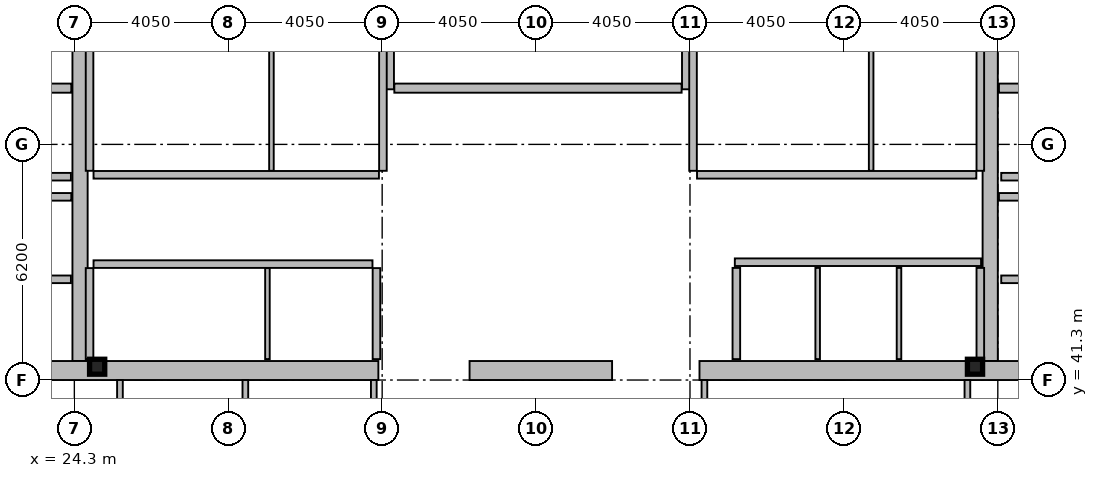
"""IFC4 building model, lengths in metres.
Left out: names, types, materials, properties, quantities, classifications, styles, units other than length and angle.
Written with IfcOpenShell. Run it as: python <this file> out.ifc"""

import sys

from ifc_helpers import new_model, si_unit, direction, frame, frame_2d, origin, origin_2d, place, context, subcontext, project, spatial, rectangle, i_section, extrude, element, fill, save


model = new_model("IFC4")
c1 = context("Model", 3, precision=1e-05, world=origin(), true_north=direction((0.0, 1.0)))
c2 = subcontext(c1, "Body", "Model", "MODEL_VIEW")
j1 = project(units=[si_unit("LENGTHUNIT", "METRE"), si_unit("PLANEANGLEUNIT", "RADIAN")], contexts=[c1])
p1 = place(None, origin())
s1 = spatial("IfcSite", under=j1, at=p1, CompositionType="ELEMENT")
p2 = place(p1, origin())
s2 = spatial("IfcBuilding", under=s1, at=p2, CompositionType="ELEMENT")
p3 = place(p2, frame((0.0, 0.0, 329.0)))
s3 = spatial("IfcBuildingStorey", under=s2, at=p3, CompositionType="ELEMENT", Elevation=329.0)
for number, where, z_axis, x_axis in (
    (1, (24.45, 41.8, 0.0), (0.0, 0.0, 1.0), (0.0, 1.0, 0.0)),
    (2, (48.4, 41.8, 0.0), (0.0, 0.0, 1.0), (0.0, 1.0, 0.0)),
):
    element("IfcWall", number, at=place(p3, frame(where, z_axis=z_axis, x_axis=x_axis)), inside=s3, PredefinedType="SHEAR", context=c2, shape_type="SweptSolid", body=[
        extrude(rectangle(XDim=11.4, YDim=0.4, at=frame_2d((5.7, 0.0))), origin(), (0.0, 0.0, 1.0), 3.44),
    ])
p4 = place(p3, frame((32.3, 41.55, 0.0), z_axis=(0.0, 0.0, 1.0), x_axis=(-1.0, 0.0, 0.0)))
e3 = element("IfcWall", 3, at=p4, inside=s3, PredefinedType="SHEAR", context=c2, shape_type="SweptSolid", body=[
    extrude(rectangle(XDim=11.45, YDim=0.5, at=frame_2d((5.725, 0.0))), origin(), (0.0, 0.0, 1.0), 3.44),
])
p5 = place(p3, frame((38.45, 41.55, 0.0), z_axis=(0.0, 0.0, 1.0), x_axis=(-1.0, 0.0, 0.0)))
e4 = element("IfcWall", 4, at=p5, inside=s3, PredefinedType="SHEAR", context=c2, shape_type="SweptSolid", body=[
    extrude(rectangle(XDim=3.75, YDim=0.5, at=frame_2d((1.875, 0.0))), origin(), (0.0, 0.0, 1.0), 3.44),
])
p6 = place(p3, frame((52.05, 41.55, 0.0), z_axis=(0.0, 0.0, 1.0), x_axis=(-1.0, 0.0, 0.0)))
e5 = element("IfcWall", 5, at=p6, inside=s3, PredefinedType="SHEAR", context=c2, shape_type="SweptSolid", body=[
    extrude(rectangle(XDim=11.3, YDim=0.5, at=frame_2d((5.65, 0.0))), origin(), (0.0, 0.0, 1.0), 3.44),
])
for number, where, z_axis, x_axis in (
    (6, (32.58, 48.95, 0.0), (0.0, 0.0, 1.0), (0.0, 1.0, 0.0)),
    (7, (40.42, 48.95, 0.0), (0.0, 0.0, 1.0), (0.0, 1.0, 0.0)),
):
    element("IfcWall", number, at=place(p3, frame(where, z_axis=z_axis, x_axis=x_axis)), inside=s3, PredefinedType="SHEAR", context=c2, shape_type="SweptSolid", body=[
        extrude(rectangle(XDim=4.25, YDim=0.26, at=frame_2d((2.125, 0.0))), origin(), (0.0, 0.0, 1.0), 3.44),
    ])
p7 = place(p3, frame((16.7, 48.98, 0.0), z_axis=(0.0, 0.0, 1.0), x_axis=(1.0, 0.0, 0.0)))
e8 = element("IfcWall", 8, at=p7, inside=s3, PredefinedType="SHEAR", context=c2, shape_type="SweptSolid", body=[
    extrude(rectangle(XDim=7.52, YDim=0.24, at=frame_2d((3.76, 0.0))), origin(), (0.0, 0.0, 1.0), 3.44),
])
p8 = place(p7, frame((0.22, 0.0, 0.0)))
e9 = element("IfcOpeningElement", 9, at=p8, cuts=e8, PredefinedType="OPENING", context=c2, shape_type="SweptSolid", body=[
    extrude(rectangle(XDim=1.05, YDim=2.15, at=frame_2d((0.525, 1.075))), frame((0.0, 0.13, 0.0), z_axis=(0.0, -1.0, 0.0), x_axis=(1.0, 0.0, 0.0)), (0.0, 0.0, 1.0), 0.26),
])
p9 = place(p3, frame((48.63, 48.98, 0.0), z_axis=(0.0, 0.0, 1.0), x_axis=(1.0, 0.0, 0.0)))
e10 = element("IfcWall", 10, at=p9, inside=s3, PredefinedType="SHEAR", context=c2, shape_type="SweptSolid", body=[
    extrude(rectangle(XDim=7.57, YDim=0.24, at=frame_2d((3.785, 0.0))), origin(), (0.0, 0.0, 1.0), 3.44),
])
p10 = place(p9, frame((6.3, 0.0, 0.0)))
e11 = element("IfcOpeningElement", 11, at=p10, cuts=e10, PredefinedType="OPENING", context=c2, shape_type="SweptSolid", body=[
    extrude(rectangle(XDim=1.05, YDim=2.15, at=frame_2d((0.525, 1.075))), frame((0.0, 0.13, 0.0), z_axis=(0.0, -1.0, 0.0), x_axis=(1.0, 0.0, 0.0)), (0.0, 0.0, 1.0), 0.26),
])
p11 = place(p3, frame((32.72, 48.98, 0.0), z_axis=(0.0, 0.0, 1.0), x_axis=(1.0, 0.0, 0.0)))
e12 = element("IfcWall", 12, at=p11, inside=s3, PredefinedType="SHEAR", context=c2, shape_type="SweptSolid", body=[
    extrude(rectangle(XDim=7.56, YDim=0.24, at=frame_2d((3.78, 0.0))), origin(), (0.0, 0.0, 1.0), 3.44),
])
p12 = place(p11, frame((0.22, 0.0, 0.0)))
e13 = element("IfcOpeningElement", 13, at=p12, cuts=e12, PredefinedType="OPENING", context=c2, shape_type="SweptSolid", body=[
    extrude(rectangle(XDim=1.05, YDim=2.15, at=frame_2d((0.525, 1.075))), frame((0.0, 0.13, 0.0), z_axis=(0.0, -1.0, 0.0), x_axis=(1.0, 0.0, 0.0)), (0.0, 0.0, 1.0), 0.26),
])
for number, where, z_axis, x_axis in (
    (14, (24.9, 41.65, 0.0), (0.0, 0.0, 1.0), (1.0, 0.0, 0.0)),
    (15, (48.0, 41.65, 0.0), (0.0, 0.0, 1.0), (1.0, 0.0, 0.0)),
):
    element("IfcColumn", number, at=place(p3, frame(where, z_axis=z_axis, x_axis=x_axis)), inside=s3, PredefinedType="COLUMN", context=c2, shape_type="SweptSolid", body=[
        extrude(i_section(OverallWidth=0.399, OverallDepth=0.393, WebThickness=0.023, FlangeThickness=0.037, at=origin_2d()), origin(), (0.0, 0.0, 1.0), 3.6),
    ])
p13 = place(p3, frame((41.68, 44.4, 0.0), z_axis=(0.0, 0.0, 1.0), x_axis=(1.0, 0.0, 0.0)))
e16 = element("IfcWall", 16, at=p13, inside=s3, PredefinedType="PARTITIONING", context=c2, shape_type="SweptSolid", body=[
    extrude(rectangle(XDim=6.48, YDim=0.2, at=frame_2d((3.24, 0.0))), origin(), (0.0, 0.0, 1.0), 3.44),
])
p14 = place(p13, frame((0.58, 0.0, 0.0)))
e17 = element("IfcOpeningElement", 17, at=p14, cuts=e16, PredefinedType="OPENING", context=c2, shape_type="SweptSolid", body=[
    extrude(rectangle(XDim=1.1, YDim=2.18, at=frame_2d((0.55, 1.09))), frame((0.0, 0.11, 0.0), z_axis=(0.0, -1.0, 0.0), x_axis=(1.0, 0.0, 0.0)), (0.0, 0.0, 1.0), 0.22),
])
p15 = place(p13, frame((2.74, 0.0, 0.0)))
e18 = element("IfcOpeningElement", 18, at=p15, cuts=e16, PredefinedType="OPENING", context=c2, shape_type="SweptSolid", body=[
    extrude(rectangle(XDim=1.1, YDim=2.18, at=frame_2d((0.55, 1.09))), frame((0.0, 0.11, 0.0), z_axis=(0.0, -1.0, 0.0), x_axis=(1.0, 0.0, 0.0)), (0.0, 0.0, 1.0), 0.22),
])
p16 = place(p13, frame((4.9, 0.0, 0.0)))
e19 = element("IfcOpeningElement", 19, at=p16, cuts=e16, PredefinedType="OPENING", context=c2, shape_type="SweptSolid", body=[
    extrude(rectangle(XDim=1.1, YDim=2.18, at=frame_2d((0.55, 1.09))), frame((0.0, 0.11, 0.0), z_axis=(0.0, -1.0, 0.0), x_axis=(1.0, 0.0, 0.0)), (0.0, 0.0, 1.0), 0.22),
])
p17 = place(p3, frame((51.61, 43.95, 0.0), z_axis=(0.0, 0.0, 1.0), x_axis=(-1.0, 0.0, 0.0)))
e20 = element("IfcWall", 20, at=p17, inside=s3, PredefinedType="PARTITIONING", context=c2, shape_type="SweptSolid", body=[
    extrude(rectangle(XDim=2.92, YDim=0.2, at=frame_2d((1.46, 0.0))), origin(), (0.0, 0.0, 1.0), 3.44),
])
p18 = place(p17, frame((0.81, 0.0, 0.0)))
e21 = element("IfcOpeningElement", 21, at=p18, cuts=e20, PredefinedType="OPENING", context=c2, shape_type="SweptSolid", body=[
    extrude(rectangle(XDim=1.3, YDim=2.18, at=frame_2d((0.65, 1.09))), frame((0.0, 0.11, 0.0), z_axis=(0.0, -1.0, 0.0), x_axis=(1.0, 0.0, 0.0)), (0.0, 0.0, 1.0), 0.22),
])
p19 = place(p3, frame((24.21, 43.95, 0.0), z_axis=(0.0, 0.0, 1.0), x_axis=(-1.0, 0.0, 0.0)))
e22 = element("IfcWall", 22, at=p19, inside=s3, PredefinedType="PARTITIONING", context=c2, shape_type="SweptSolid", body=[
    extrude(rectangle(XDim=2.97, YDim=0.2, at=frame_2d((1.485, 0.0))), origin(), (0.0, 0.0, 1.0), 3.44),
])
p20 = place(p19, frame((0.86, 0.0, 0.0)))
e23 = element("IfcOpeningElement", 23, at=p20, cuts=e22, PredefinedType="OPENING", context=c2, shape_type="SweptSolid", body=[
    extrude(rectangle(XDim=1.3, YDim=2.18, at=frame_2d((0.65, 1.09))), frame((0.0, 0.11, 0.0), z_axis=(0.0, -1.0, 0.0), x_axis=(1.0, 0.0, 0.0)), (0.0, 0.0, 1.0), 0.22),
])
p21 = place(p3, frame((51.61, 46.65, 0.0), z_axis=(0.0, 0.0, 1.0), x_axis=(-1.0, 0.0, 0.0)))
e24 = element("IfcWall", 24, at=p21, inside=s3, PredefinedType="PARTITIONING", context=c2, shape_type="SweptSolid", body=[
    extrude(rectangle(XDim=2.92, YDim=0.2, at=frame_2d((1.46, 0.0))), origin(), (0.0, 0.0, 1.0), 3.44),
])
p22 = place(p21, frame((0.86, 0.0, 0.0)))
e25 = element("IfcOpeningElement", 25, at=p22, cuts=e24, PredefinedType="OPENING", context=c2, shape_type="SweptSolid", body=[
    extrude(rectangle(XDim=1.2, YDim=2.18, at=frame_2d((0.6, 1.09))), frame((0.0, 0.11, 0.0), z_axis=(0.0, -1.0, 0.0), x_axis=(1.0, 0.0, 0.0)), (0.0, 0.0, 1.0), 0.22),
])
p23 = place(p3, frame((24.21, 46.65, 0.0), z_axis=(0.0, 0.0, 1.0), x_axis=(-1.0, 0.0, 0.0)))
e26 = element("IfcWall", 26, at=p23, inside=s3, PredefinedType="PARTITIONING", context=c2, shape_type="SweptSolid", body=[
    extrude(rectangle(XDim=2.97, YDim=0.2, at=frame_2d((1.485, 0.0))), origin(), (0.0, 0.0, 1.0), 3.44),
])
p24 = place(p23, frame((0.91, 0.0, 0.0)))
e27 = element("IfcOpeningElement", 27, at=p24, cuts=e26, PredefinedType="OPENING", context=c2, shape_type="SweptSolid", body=[
    extrude(rectangle(XDim=1.2, YDim=2.18, at=frame_2d((0.6, 1.09))), frame((0.0, 0.11, 0.0), z_axis=(0.0, -1.0, 0.0), x_axis=(1.0, 0.0, 0.0)), (0.0, 0.0, 1.0), 0.22),
])
p25 = place(p3, frame((21.2, 46.12, 0.0), z_axis=(0.0, 0.0, 1.0), x_axis=(1.0, 0.0, 0.0)))
e28 = element("IfcWall", 28, at=p25, inside=s3, PredefinedType="PARTITIONING", context=c2, shape_type="SweptSolid", body=[
    extrude(rectangle(XDim=3.02, YDim=0.2, at=frame_2d((1.51, 0.0))), origin(), (0.0, 0.0, 1.0), 3.44),
])
p26 = place(p3, frame((48.63, 46.12, 0.0), z_axis=(0.0, 0.0, 1.0), x_axis=(1.0, 0.0, 0.0)))
e29 = element("IfcWall", 29, at=p26, inside=s3, PredefinedType="PARTITIONING", context=c2, shape_type="SweptSolid", body=[
    extrude(rectangle(XDim=3.07, YDim=0.2, at=frame_2d((1.535, 0.0))), origin(), (0.0, 0.0, 1.0), 3.44),
])
for number, where, z_axis, x_axis in (
    (30, (24.7, 46.805, 0.0), (0.0, 0.0, 1.0), (0.0, 1.0, 0.0)),
    (31, (32.42, 46.805, 0.0), (0.0, 0.0, 1.0), (0.0, 1.0, 0.0)),
):
    element("IfcWall", number, at=place(p3, frame(where, z_axis=z_axis, x_axis=x_axis)), inside=s3, PredefinedType="PARTITIONING", context=c2, shape_type="SweptSolid", body=[
        extrude(rectangle(XDim=5.99, YDim=0.2, at=frame_2d((2.995, 0.0))), origin(), (0.0, 0.0, 1.0), 3.44),
    ])
p27 = place(p3, frame((29.486, 46.805, 0.0), z_axis=(0.0, 0.0, 1.0), x_axis=(0.0, 1.0, 0.0)))
e32 = element("IfcWall", 32, at=p27, inside=s3, PredefinedType="PARTITIONING", context=c2, shape_type="SweptSolid", body=[
    extrude(rectangle(XDim=5.99, YDim=0.12, at=frame_2d((2.995, 0.0))), origin(), (0.0, 0.0, 1.0), 3.44),
])
p28 = place(p3, frame((24.805, 46.7, 0.0), z_axis=(0.0, 0.0, 1.0), x_axis=(1.0, 0.0, 0.0)))
e33 = element("IfcWall", 33, at=p28, inside=s3, PredefinedType="PARTITIONING", context=c2, shape_type="SweptSolid", body=[
    extrude(rectangle(XDim=7.51, YDim=0.2, at=frame_2d((3.755, 0.0))), origin(), (0.0, 0.0, 1.0), 3.44),
])
p29 = place(p28, frame((1.15, 0.0, 0.0)))
e34 = element("IfcOpeningElement", 34, at=p29, cuts=e33, PredefinedType="OPENING", context=c2, shape_type="SweptSolid", body=[
    extrude(rectangle(XDim=0.95, YDim=2.1, at=frame_2d((0.475, 1.05))), frame((0.0, 0.11, 0.0), z_axis=(0.0, -1.0, 0.0), x_axis=(1.0, 0.0, 0.0)), (0.0, 0.0, 1.0), 0.22),
])
p30 = place(p28, frame((5.336, 0.0, 0.0)))
e35 = element("IfcOpeningElement", 35, at=p30, cuts=e33, PredefinedType="OPENING", context=c2, shape_type="SweptSolid", body=[
    extrude(rectangle(XDim=0.95, YDim=2.1, at=frame_2d((0.475, 1.05))), frame((0.0, 0.11, 0.0), z_axis=(0.0, -1.0, 0.0), x_axis=(1.0, 0.0, 0.0)), (0.0, 0.0, 1.0), 0.22),
])
for number, where, z_axis, x_axis in (
    (36, (24.7, 41.85, 0.0), (0.0, 0.0, 1.0), (0.0, 1.0, 0.0)),
    (37, (32.25, 41.85, 0.0), (0.0, 0.0, 1.0), (0.0, 1.0, 0.0)),
):
    element("IfcWall", number, at=place(p3, frame(where, z_axis=z_axis, x_axis=x_axis)), inside=s3, PredefinedType="PARTITIONING", context=c2, shape_type="SweptSolid", body=[
        extrude(rectangle(XDim=2.395, YDim=0.2, at=frame_2d((1.198, 0.0))), origin(), (0.0, 0.0, 1.0), 3.44),
    ])
p31 = place(p3, frame((29.381, 41.85, 0.0), z_axis=(0.0, 0.0, 1.0), x_axis=(0.0, 1.0, 0.0)))
e38 = element("IfcWall", 38, at=p31, inside=s3, PredefinedType="PARTITIONING", context=c2, shape_type="SweptSolid", body=[
    extrude(rectangle(XDim=2.395, YDim=0.12, at=frame_2d((1.198, 0.0))), origin(), (0.0, 0.0, 1.0), 3.44),
])
p32 = place(p3, frame((24.805, 44.35, 0.0), z_axis=(0.0, 0.0, 1.0), x_axis=(1.0, 0.0, 0.0)))
e39 = element("IfcWall", 39, at=p32, inside=s3, PredefinedType="PARTITIONING", context=c2, shape_type="SweptSolid", body=[
    extrude(rectangle(XDim=7.34, YDim=0.2, at=frame_2d((3.67, 0.0))), origin(), (0.0, 0.0, 1.0), 3.44),
])
p33 = place(p32, frame((1.15, 0.0, 0.0)))
e40 = element("IfcOpeningElement", 40, at=p33, cuts=e39, PredefinedType="OPENING", context=c2, shape_type="SweptSolid", body=[
    extrude(rectangle(XDim=0.95, YDim=2.1, at=frame_2d((0.475, 1.05))), frame((0.0, 0.11, 0.0), z_axis=(0.0, -1.0, 0.0), x_axis=(1.0, 0.0, 0.0)), (0.0, 0.0, 1.0), 0.22),
])
p34 = place(p32, frame((5.231, 0.0, 0.0)))
e41 = element("IfcOpeningElement", 41, at=p34, cuts=e39, PredefinedType="OPENING", context=c2, shape_type="SweptSolid", body=[
    extrude(rectangle(XDim=0.95, YDim=2.1, at=frame_2d((0.475, 1.05))), frame((0.0, 0.11, 0.0), z_axis=(0.0, -1.0, 0.0), x_axis=(1.0, 0.0, 0.0)), (0.0, 0.0, 1.0), 0.22),
])
for number, where, z_axis, x_axis in (
    (42, (40.58, 46.805, 0.0), (0.0, 0.0, 1.0), (0.0, 1.0, 0.0)),
    (43, (48.14, 46.805, 0.0), (0.0, 0.0, 1.0), (0.0, 1.0, 0.0)),
):
    element("IfcWall", number, at=place(p3, frame(where, z_axis=z_axis, x_axis=x_axis)), inside=s3, PredefinedType="PARTITIONING", context=c2, shape_type="SweptSolid", body=[
        extrude(rectangle(XDim=5.99, YDim=0.2, at=frame_2d((2.995, 0.0))), origin(), (0.0, 0.0, 1.0), 3.44),
    ])
p35 = place(p3, frame((45.267, 46.805, 0.0), z_axis=(0.0, 0.0, 1.0), x_axis=(0.0, 1.0, 0.0)))
e44 = element("IfcWall", 44, at=p35, inside=s3, PredefinedType="PARTITIONING", context=c2, shape_type="SweptSolid", body=[
    extrude(rectangle(XDim=5.99, YDim=0.12, at=frame_2d((2.995, 0.0))), origin(), (0.0, 0.0, 1.0), 3.44),
])
p36 = place(p3, frame((40.685, 46.7, 0.0), z_axis=(0.0, 0.0, 1.0), x_axis=(1.0, 0.0, 0.0)))
e45 = element("IfcWall", 45, at=p36, inside=s3, PredefinedType="PARTITIONING", context=c2, shape_type="SweptSolid", body=[
    extrude(rectangle(XDim=7.35, YDim=0.2, at=frame_2d((3.675, 0.0))), origin(), (0.0, 0.0, 1.0), 3.44),
])
p37 = place(p36, frame((1.15, 0.0, 0.0)))
e46 = element("IfcOpeningElement", 46, at=p37, cuts=e45, PredefinedType="OPENING", context=c2, shape_type="SweptSolid", body=[
    extrude(rectangle(XDim=0.95, YDim=2.1, at=frame_2d((0.475, 1.05))), frame((0.0, 0.11, 0.0), z_axis=(0.0, -1.0, 0.0), x_axis=(1.0, 0.0, 0.0)), (0.0, 0.0, 1.0), 0.22),
])
p38 = place(p36, frame((5.237, 0.0, 0.0)))
e47 = element("IfcOpeningElement", 47, at=p38, cuts=e45, PredefinedType="OPENING", context=c2, shape_type="SweptSolid", body=[
    extrude(rectangle(XDim=0.95, YDim=2.1, at=frame_2d((0.475, 1.05))), frame((0.0, 0.11, 0.0), z_axis=(0.0, -1.0, 0.0), x_axis=(1.0, 0.0, 0.0)), (0.0, 0.0, 1.0), 0.22),
])
for number, where, z_axis, x_axis in (
    (48, (41.72, 41.85, 0.0), (0.0, 0.0, 1.0), (0.0, 1.0, 0.0)),
    (49, (48.14, 41.85, 0.0), (0.0, 0.0, 1.0), (0.0, 1.0, 0.0)),
):
    element("IfcWall", number, at=place(p3, frame(where, z_axis=z_axis, x_axis=x_axis)), inside=s3, PredefinedType="PARTITIONING", context=c2, shape_type="SweptSolid", body=[
        extrude(rectangle(XDim=2.4, YDim=0.2, at=frame_2d((1.2, 0.0))), origin(), (0.0, 0.0, 1.0), 3.44),
    ])
for number, where, z_axis, x_axis in (
    (50, (43.86, 41.85, 0.0), (0.0, 0.0, 1.0), (0.0, 1.0, 0.0)),
    (51, (46.0, 41.85, 0.0), (0.0, 0.0, 1.0), (0.0, 1.0, 0.0)),
):
    element("IfcWall", number, at=place(p3, frame(where, z_axis=z_axis, x_axis=x_axis)), inside=s3, PredefinedType="PARTITIONING", context=c2, shape_type="SweptSolid", body=[
        extrude(rectangle(XDim=2.4, YDim=0.12, at=frame_2d((1.2, 0.0))), origin(), (0.0, 0.0, 1.0), 3.44),
    ])
for number, where, z_axis, x_axis in (
    (52, (25.5, 38.28, 0.0), (0.0, 0.0, 1.0), (0.0, 1.0, 0.0)),
    (53, (28.8, 38.28, 0.0), (0.0, 0.0, 1.0), (0.0, 1.0, 0.0)),
    (54, (32.18, 38.28, 0.0), (0.0, 0.0, 1.0), (0.0, 1.0, 0.0)),
    (55, (40.88, 38.28, 0.0), (0.0, 0.0, 1.0), (0.0, 1.0, 0.0)),
):
    element("IfcWall", number, at=place(p3, frame(where, z_axis=z_axis, x_axis=x_axis)), inside=s3, PredefinedType="PARTITIONING", context=c2, shape_type="SweptSolid", body=[
        extrude(rectangle(XDim=3.02, YDim=0.15, at=frame_2d((1.51, 0.0))), origin(), (0.0, 0.0, 1.0), 3.44),
    ])
p39 = place(p3, frame((47.8, 38.28, 0.0), z_axis=(0.0, 0.0, 1.0), x_axis=(0.0, 1.0, 0.0)))
e56 = element("IfcWall", 56, at=p39, inside=s3, PredefinedType="PARTITIONING", context=c2, shape_type="SweptSolid", body=[
    extrude(rectangle(XDim=3.02, YDim=0.15, at=frame_2d((1.51, 0.0))), origin(), (0.0, 0.0, 1.0), 2.83),
])
p40 = place(p12, origin())
e57 = element("IfcDoor", 57, at=p40, inside=s3, OperationType="SINGLE_SWING_LEFT", PredefinedType="DOOR", context=c2, shape_type="SweptSolid", body=[
    extrude(rectangle(XDim=1.05, YDim=2.15, at=frame_2d((0.525, 1.075))), frame((0.0, 0.025, 0.0), z_axis=(0.0, -1.0, 0.0), x_axis=(1.0, 0.0, 0.0)), (0.0, 0.0, 1.0), 0.05),
])
fill(e13, e57)
p41 = place(p14, origin())
e58 = element("IfcDoor", 58, at=p41, inside=s3, OperationType="SLIDING_TO_LEFT", PredefinedType="DOOR", context=c2, shape_type="SweptSolid", body=[
    extrude(rectangle(XDim=1.1, YDim=2.18, at=frame_2d((0.55, 1.09))), frame((0.0, 0.025, 0.0), z_axis=(0.0, -1.0, 0.0), x_axis=(1.0, 0.0, 0.0)), (0.0, 0.0, 1.0), 0.05),
])
fill(e17, e58)
p42 = place(p15, origin())
e59 = element("IfcDoor", 59, at=p42, inside=s3, OperationType="SLIDING_TO_LEFT", PredefinedType="DOOR", context=c2, shape_type="SweptSolid", body=[
    extrude(rectangle(XDim=1.1, YDim=2.18, at=frame_2d((0.55, 1.09))), frame((0.0, 0.025, 0.0), z_axis=(0.0, -1.0, 0.0), x_axis=(1.0, 0.0, 0.0)), (0.0, 0.0, 1.0), 0.05),
])
fill(e18, e59)
p43 = place(p16, origin())
e60 = element("IfcDoor", 60, at=p43, inside=s3, OperationType="SLIDING_TO_LEFT", PredefinedType="DOOR", context=c2, shape_type="SweptSolid", body=[
    extrude(rectangle(XDim=1.1, YDim=2.18, at=frame_2d((0.55, 1.09))), frame((0.0, 0.025, 0.0), z_axis=(0.0, -1.0, 0.0), x_axis=(1.0, 0.0, 0.0)), (0.0, 0.0, 1.0), 0.05),
])
fill(e19, e60)
p44 = place(p29, origin())
e61 = element("IfcDoor", 61, at=p44, inside=s3, OperationType="SINGLE_SWING_RIGHT", PredefinedType="DOOR", context=c2, shape_type="SweptSolid", body=[
    extrude(rectangle(XDim=0.95, YDim=2.1, at=frame_2d((0.475, 1.05))), frame((0.0, 0.025, 0.0), z_axis=(0.0, -1.0, 0.0), x_axis=(1.0, 0.0, 0.0)), (0.0, 0.0, 1.0), 0.05),
])
fill(e34, e61)
p45 = place(p30, origin())
e62 = element("IfcDoor", 62, at=p45, inside=s3, OperationType="SINGLE_SWING_LEFT", PredefinedType="DOOR", context=c2, shape_type="SweptSolid", body=[
    extrude(rectangle(XDim=0.95, YDim=2.1, at=frame_2d((0.475, 1.05))), frame((0.0, 0.025, 0.0), z_axis=(0.0, -1.0, 0.0), x_axis=(1.0, 0.0, 0.0)), (0.0, 0.0, 1.0), 0.05),
])
fill(e35, e62)
p46 = place(p33, origin())
e63 = element("IfcDoor", 63, at=p46, inside=s3, OperationType="SINGLE_SWING_RIGHT", PredefinedType="DOOR", context=c2, shape_type="SweptSolid", body=[
    extrude(rectangle(XDim=0.95, YDim=2.1, at=frame_2d((0.475, 1.05))), frame((0.0, 0.025, 0.0), z_axis=(0.0, -1.0, 0.0), x_axis=(1.0, 0.0, 0.0)), (0.0, 0.0, 1.0), 0.05),
])
fill(e40, e63)
p47 = place(p34, origin())
e64 = element("IfcDoor", 64, at=p47, inside=s3, OperationType="SINGLE_SWING_LEFT", PredefinedType="DOOR", context=c2, shape_type="SweptSolid", body=[
    extrude(rectangle(XDim=0.95, YDim=2.1, at=frame_2d((0.475, 1.05))), frame((0.0, 0.025, 0.0), z_axis=(0.0, -1.0, 0.0), x_axis=(1.0, 0.0, 0.0)), (0.0, 0.0, 1.0), 0.05),
])
fill(e41, e64)
p48 = place(p37, origin())
e65 = element("IfcDoor", 65, at=p48, inside=s3, OperationType="SINGLE_SWING_RIGHT", PredefinedType="DOOR", context=c2, shape_type="SweptSolid", body=[
    extrude(rectangle(XDim=0.95, YDim=2.1, at=frame_2d((0.475, 1.05))), frame((0.0, 0.025, 0.0), z_axis=(0.0, -1.0, 0.0), x_axis=(1.0, 0.0, 0.0)), (0.0, 0.0, 1.0), 0.05),
])
fill(e46, e65)
p49 = place(p38, origin())
e66 = element("IfcDoor", 66, at=p49, inside=s3, OperationType="SINGLE_SWING_LEFT", PredefinedType="DOOR", context=c2, shape_type="SweptSolid", body=[
    extrude(rectangle(XDim=0.95, YDim=2.1, at=frame_2d((0.475, 1.05))), frame((0.0, 0.025, 0.0), z_axis=(0.0, -1.0, 0.0), x_axis=(1.0, 0.0, 0.0)), (0.0, 0.0, 1.0), 0.05),
])
fill(e47, e66)
save(model, sys.argv[1])
